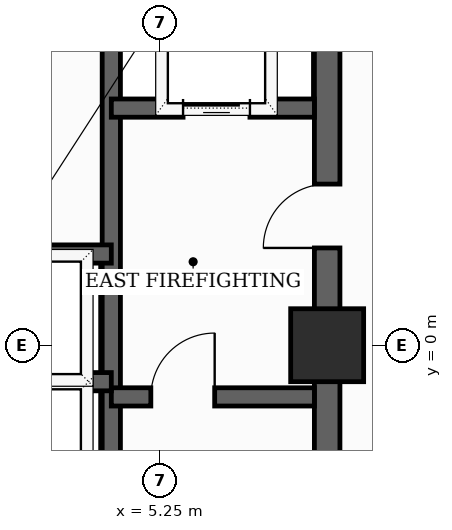
"""IFC4 building model, lengths in metres.
Left out: names, types, materials, properties, quantities, classifications, styles, units other than length and angle.
Written with IfcOpenShell. Run it as: python <this file> out.ifc"""

import sys

from ifc_helpers import new_model, si_unit, direction, frame, frame_2d, origin, origin_2d, place, context, subcontext, project, spatial, rectangle, extrude, element, fill, save


model = new_model("IFC4")
c1 = context("Model", 3, precision=1e-05, world=origin(), true_north=direction((0.0, 1.0)))
c2 = subcontext(c1, "Body", "Model", "MODEL_VIEW")
j1 = project(units=[si_unit("LENGTHUNIT", "METRE"), si_unit("PLANEANGLEUNIT", "RADIAN")], contexts=[c1])
p1 = place(None, origin())
s1 = spatial("IfcSite", under=j1, at=p1, CompositionType="ELEMENT")
p2 = place(p1, origin())
s2 = spatial("IfcBuilding", under=s1, at=p2, CompositionType="ELEMENT")
p3 = place(p2, frame((0.0, 0.0, 218.9)))
s3 = spatial("IfcBuildingStorey", under=s2, at=p3, CompositionType="ELEMENT", Elevation=218.9)
p4 = place(p3, frame((8.0, 0.0, 0.0), z_axis=(0.0, 0.0, 1.0), x_axis=(1.0, 0.0, 0.0)))
e1 = element("IfcColumn", 1, at=p4, inside=s3, PredefinedType="COLUMN", context=c2, shape_type="SweptSolid", body=[
    extrude(rectangle(XDim=1.2, YDim=1.2, at=origin_2d()), origin(), (0.0, 0.0, 1.0), 3.7),
])
p5 = place(p3, frame((8.0, -8.0, 0.0), z_axis=(0.0, 0.0, 1.0), x_axis=(0.0, 1.0, 0.0)))
e2 = element("IfcWall", 2, at=p5, inside=s3, PredefinedType="SHEAR", context=c2, shape_type="SweptSolid", body=[
    extrude(rectangle(XDim=16.0, YDim=0.42, at=frame_2d((8.0, 0.0))), origin(), (0.0, 0.0, 1.0), 3.5),
])
p6 = place(p5, frame((9.6, 0.0, 0.0)))
e3 = element("IfcOpeningElement", 3, at=p6, cuts=e2, PredefinedType="OPENING", context=c2, shape_type="SweptSolid", body=[
    extrude(rectangle(XDim=1.05, YDim=2.15, at=frame_2d((0.525, 1.075))), frame((0.0, 0.22, 0.0), z_axis=(0.0, -1.0, 0.0), x_axis=(1.0, 0.0, 0.0)), (0.0, 0.0, 1.0), 0.44),
])
p7 = place(p5, frame((14.389, 0.0, 0.0)))
e4 = element("IfcOpeningElement", 4, at=p7, cuts=e2, PredefinedType="OPENING", context=c2, shape_type="SweptSolid", body=[
    extrude(rectangle(XDim=0.85, YDim=2.02, at=frame_2d((0.425, 1.01))), frame((0.0, 0.22, 0.0), z_axis=(0.0, -1.0, 0.0), x_axis=(1.0, 0.0, 0.0)), (0.0, 0.0, 1.0), 0.44),
])
p8 = place(p3, frame((4.45, -7.79, 0.0), z_axis=(0.0, 0.0, 1.0), x_axis=(0.0, 1.0, 0.0)))
e5 = element("IfcWall", 5, at=p8, inside=s3, PredefinedType="SHEAR", context=c2, shape_type="SweptSolid", body=[
    extrude(rectangle(XDim=15.58, YDim=0.3, at=frame_2d((7.79, 0.0))), origin(), (0.0, 0.0, 1.0), 3.5),
])
p9 = place(p3, frame((4.45, -0.85, 0.0), z_axis=(0.0, 0.0, 1.0), x_axis=(1.0, 0.0, 0.0)))
e6 = element("IfcWall", 6, at=p9, inside=s3, PredefinedType="SHEAR", context=c2, shape_type="SweptSolid", body=[
    extrude(rectangle(XDim=3.34, YDim=0.3, at=frame_2d((1.67, 0.0))), origin(), (0.0, 0.0, 1.0), 3.5),
])
p10 = place(p9, frame((0.65, 0.0, 0.0)))
e7 = element("IfcOpeningElement", 7, at=p10, cuts=e6, PredefinedType="OPENING", context=c2, shape_type="SweptSolid", body=[
    extrude(rectangle(XDim=1.05, YDim=2.15, at=frame_2d((0.525, 1.075))), frame((0.0, 0.16, 0.0), z_axis=(0.0, -1.0, 0.0), x_axis=(1.0, 0.0, 0.0)), (0.0, 0.0, 1.0), 0.32),
])
p11 = place(p3, frame((4.45, 3.9, 0.0), z_axis=(0.0, 0.0, 1.0), x_axis=(1.0, 0.0, 0.0)))
e8 = element("IfcWall", 8, at=p11, inside=s3, PredefinedType="SHEAR", context=c2, shape_type="SweptSolid", body=[
    extrude(rectangle(XDim=3.34, YDim=0.3, at=frame_2d((1.67, 0.0))), origin(), (0.0, 0.0, 1.0), 3.5),
])
p12 = place(p11, frame((1.18, 0.0, 0.0)))
e9 = element("IfcOpeningElement", 9, at=p12, cuts=e8, PredefinedType="OPENING", context=c2, shape_type="SweptSolid", body=[
    extrude(rectangle(XDim=1.1, YDim=2.1, at=frame_2d((0.55, 1.05))), frame((0.0, 0.16, 0.0), z_axis=(0.0, -1.0, 0.0), x_axis=(1.0, 0.0, 0.0)), (0.0, 0.0, 1.0), 0.32),
])
for number, where, z_axis, x_axis in (
    (10, (1.68, 1.5, 0.0), (0.0, 0.0, 1.0), (1.0, 0.0, 0.0)),
    (11, (1.68, -0.6, 0.0), (0.0, 0.0, 1.0), (1.0, 0.0, 0.0)),
):
    element("IfcWall", number, at=place(p3, frame(where, z_axis=z_axis, x_axis=x_axis)), inside=s3, PredefinedType="SHEAR", context=c2, shape_type="SweptSolid", body=[
        extrude(rectangle(XDim=2.77, YDim=0.3, at=frame_2d((1.385, 0.0))), origin(), (0.0, 0.0, 1.0), 3.5),
    ])
p13 = place(p6, origin())
e12 = element("IfcDoor", 12, at=p13, inside=s3, OperationType="SINGLE_SWING_LEFT", PredefinedType="DOOR", context=c2, shape_type="SweptSolid", body=[
    extrude(rectangle(XDim=1.05, YDim=2.15, at=frame_2d((0.525, 1.075))), frame((0.0, 0.025, 0.0), z_axis=(0.0, -1.0, 0.0), x_axis=(1.0, 0.0, 0.0)), (0.0, 0.0, 1.0), 0.05),
])
fill(e3, e12)
p14 = place(p10, origin())
e13 = element("IfcDoor", 13, at=p14, inside=s3, OperationType="SINGLE_SWING_RIGHT", PredefinedType="DOOR", context=c2, shape_type="SweptSolid", body=[
    extrude(rectangle(XDim=1.05, YDim=2.15, at=frame_2d((0.525, 1.075))), frame((0.0, 0.025, 0.0), z_axis=(0.0, -1.0, 0.0), x_axis=(1.0, 0.0, 0.0)), (0.0, 0.0, 1.0), 0.05),
])
fill(e7, e13)
p15 = place(p12, origin())
e14 = element("IfcDoor", 14, at=p15, inside=s3, OperationType="SLIDING_TO_LEFT", PredefinedType="DOOR", context=c2, shape_type="SweptSolid", body=[
    extrude(rectangle(XDim=1.1, YDim=2.1, at=frame_2d((0.55, 1.05))), frame((0.0, 0.025, 0.0), z_axis=(0.0, -1.0, 0.0), x_axis=(1.0, 0.0, 0.0)), (0.0, 0.0, 1.0), 0.05),
])
fill(e9, e14)
save(model, sys.argv[1])
